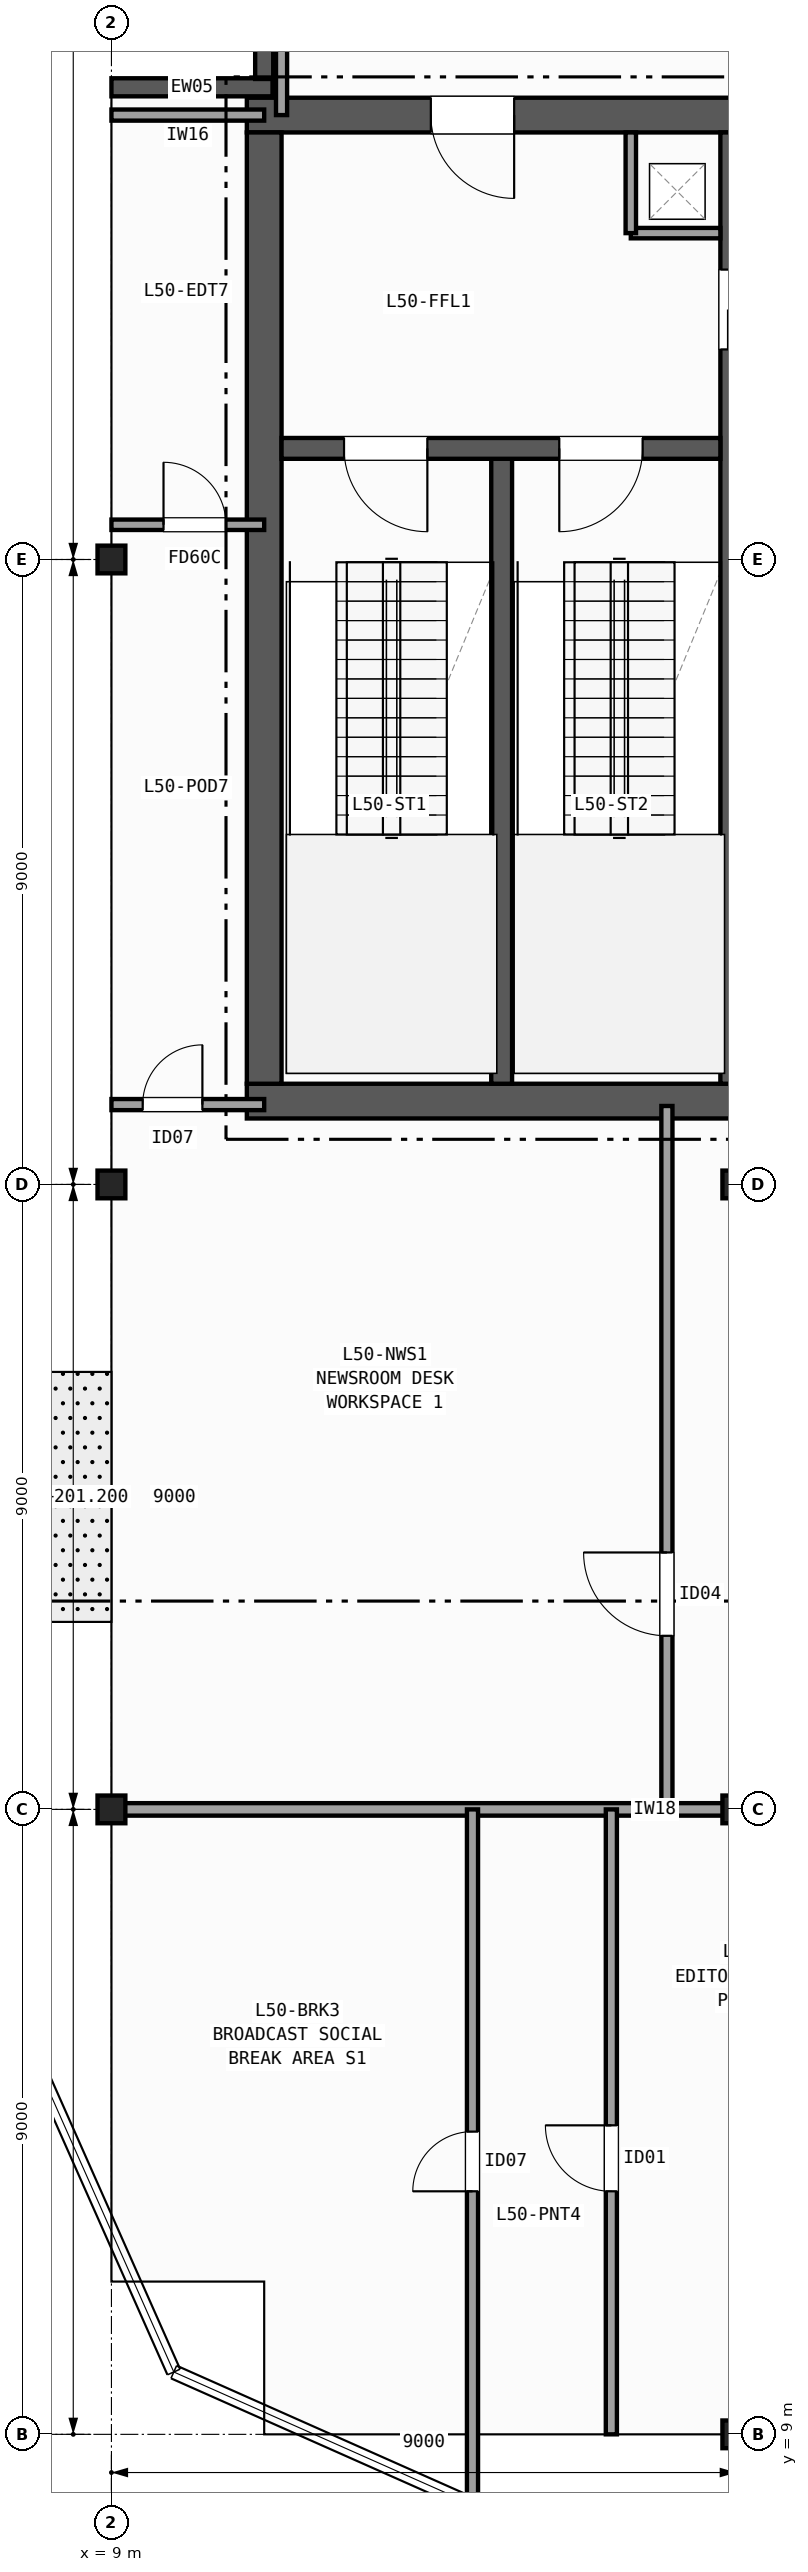
"""IFC4 building model, lengths in metres.
Left out: names, types, materials, properties, quantities, classifications, styles, units other than length and angle.
Written with IfcOpenShell. Run it as: python <this file> out.ifc"""

import sys

from ifc_helpers import new_model, si_unit, direction, frame, frame_2d, origin, origin_2d, place, context, subcontext, project, spatial, rectangle, i_section, extrude, element, fill, save


model = new_model("IFC4")
c1 = context("Model", 3, precision=1e-05, world=origin(), true_north=direction((0.0, 1.0)))
c2 = subcontext(c1, "Body", "Model", "MODEL_VIEW")
j1 = project(units=[si_unit("LENGTHUNIT", "METRE"), si_unit("PLANEANGLEUNIT", "RADIAN")], contexts=[c1])
p1 = place(None, origin())
s1 = spatial("IfcSite", under=j1, at=p1, CompositionType="ELEMENT")
p2 = place(p1, origin())
s2 = spatial("IfcBuilding", under=s1, at=p2, CompositionType="ELEMENT")
p3 = place(p2, frame((0.0, 0.0, 201.2)))
s3 = spatial("IfcBuildingStorey", under=s2, at=p3, CompositionType="ELEMENT", Elevation=201.2)
for number, where, z_axis, x_axis in (
    (1, (9.0, 18.0, 0.0), (0.0, 0.0, 1.0), (1.0, 0.0, 0.0)),
    (2, (9.0, 27.0, 0.0), (0.0, 0.0, 1.0), (1.0, 0.0, 0.0)),
    (3, (9.0, 36.0, 0.0), (0.0, 0.0, 1.0), (1.0, 0.0, 0.0)),
    (4, (18.0, 9.0, 0.0), (0.0, 0.0, 1.0), (1.0, 0.0, 0.0)),
    (5, (18.0, 18.0, 0.0), (0.0, 0.0, 1.0), (1.0, 0.0, 0.0)),
    (6, (18.0, 27.0, 0.0), (0.0, 0.0, 1.0), (1.0, 0.0, 0.0)),
):
    element("IfcColumn", number, at=place(p3, frame(where, z_axis=z_axis, x_axis=x_axis)), inside=s3, PredefinedType="COLUMN", context=c2, shape_type="SweptSolid", body=[
        extrude(i_section(OverallWidth=0.401, OverallDepth=0.399, WebThickness=0.025, FlangeThickness=0.04, FilletRadius=0.015, at=origin_2d()), origin(), (0.0, 0.0, 1.0), 5.0),
    ])
p4 = place(p3, frame((9.0, 42.8, 0.0), z_axis=(0.0, 0.0, 1.0), x_axis=(1.0, 0.0, 0.0)))
e7 = element("IfcWall", 7, at=p4, inside=s3, PredefinedType="SOLIDWALL", context=c2, shape_type="SweptSolid", body=[
    extrude(rectangle(XDim=2.32, YDim=0.26, at=frame_2d((1.16, 0.0))), origin(), (0.0, 0.0, 1.0), 4.72),
])
p5 = place(p3, frame((11.2, 42.92, 0.0), z_axis=(0.0, 0.0, 1.0), x_axis=(0.0, 1.0, 0.0)))
e8 = element("IfcWall", 8, at=p5, inside=s3, PredefinedType="SOLIDWALL", context=c2, shape_type="SweptSolid", body=[
    extrude(rectangle(XDim=2.08, YDim=0.26, at=frame_2d((1.04, 0.0))), origin(), (0.0, 0.0, 1.0), 4.72),
])
p6 = place(p3, frame((10.95, 28.2, 0.0), z_axis=(0.0, 0.0, 1.0), x_axis=(1.0, 0.0, 0.0)))
e9 = element("IfcWall", 9, at=p6, inside=s3, PredefinedType="SHEAR", context=c2, shape_type="SweptSolid", body=[
    extrude(rectangle(XDim=13.9, YDim=0.5, at=frame_2d((6.95, 0.0))), origin(), (0.0, 0.0, 1.0), 4.72),
])
p7 = place(p3, frame((24.85, 42.4, 0.0), z_axis=(0.0, 0.0, 1.0), x_axis=(-1.0, 0.0, 0.0)))
e10 = element("IfcWall", 10, at=p7, inside=s3, PredefinedType="SHEAR", context=c2, shape_type="SweptSolid", body=[
    extrude(rectangle(XDim=13.9, YDim=0.5, at=frame_2d((6.95, 0.0))), origin(), (0.0, 0.0, 1.0), 4.72),
])
p8 = place(p7, frame((10.05, 0.0, 0.0)))
e11 = element("IfcOpeningElement", 11, at=p8, cuts=e10, PredefinedType="OPENING", context=c2, shape_type="SweptSolid", body=[
    extrude(rectangle(XDim=1.2, YDim=2.15, at=frame_2d((0.6, 1.075))), frame((0.0, 0.26, 0.0), z_axis=(0.0, -1.0, 0.0), x_axis=(1.0, 0.0, 0.0)), (0.0, 0.0, 1.0), 0.52),
])
p9 = place(p7, frame((3.0, 0.0, 0.0)))
e12 = element("IfcOpeningElement", 12, at=p9, cuts=e10, PredefinedType="OPENING", context=c2, shape_type="SweptSolid", body=[
    extrude(rectangle(XDim=0.9, YDim=2.1, at=frame_2d((0.45, 1.05))), frame((0.0, 0.26, 0.0), z_axis=(0.0, -1.0, 0.0), x_axis=(1.0, 0.0, 0.0)), (0.0, 0.0, 1.0), 0.52),
])
p10 = place(p3, frame((11.2, 42.15, 0.0), z_axis=(0.0, 0.0, 1.0), x_axis=(0.0, -1.0, 0.0)))
e13 = element("IfcWall", 13, at=p10, inside=s3, PredefinedType="SHEAR", context=c2, shape_type="SweptSolid", body=[
    extrude(rectangle(XDim=13.7, YDim=0.5, at=frame_2d((6.85, 0.0))), origin(), (0.0, 0.0, 1.0), 4.72),
])
p11 = place(p3, frame((14.62, 28.45, 0.0), z_axis=(0.0, 0.0, 1.0), x_axis=(0.0, 1.0, 0.0)))
e14 = element("IfcWall", 14, at=p11, inside=s3, PredefinedType="SHEAR", context=c2, shape_type="SweptSolid", body=[
    extrude(rectangle(XDim=9.0, YDim=0.3, at=frame_2d((4.5, 0.0))), origin(), (0.0, 0.0, 1.0), 4.72),
])
p12 = place(p3, frame((17.92, 42.15, 0.0), z_axis=(0.0, 0.0, 1.0), x_axis=(0.0, -1.0, 0.0)))
e15 = element("IfcWall", 15, at=p12, inside=s3, PredefinedType="SHEAR", context=c2, shape_type="SweptSolid", body=[
    extrude(rectangle(XDim=13.7, YDim=0.3, at=frame_2d((6.85, 0.0))), origin(), (0.0, 0.0, 1.0), 4.72),
])
p13 = place(p12, frame((1.975, 0.0, 0.0)))
e16 = element("IfcOpeningElement", 16, at=p13, cuts=e15, PredefinedType="OPENING", context=c2, shape_type="SweptSolid", body=[
    extrude(rectangle(XDim=1.15, YDim=2.15, at=frame_2d((0.575, 1.075))), frame((0.0, 0.16, 0.0), z_axis=(0.0, -1.0, 0.0), x_axis=(1.0, 0.0, 0.0)), (0.0, 0.0, 1.0), 0.32),
])
p14 = place(p3, frame((17.77, 37.6, 0.0), z_axis=(0.0, 0.0, 1.0), x_axis=(-1.0, 0.0, 0.0)))
e17 = element("IfcWall", 17, at=p14, inside=s3, PredefinedType="SHEAR", context=c2, shape_type="SweptSolid", body=[
    extrude(rectangle(XDim=6.32, YDim=0.3, at=frame_2d((3.16, 0.0))), origin(), (0.0, 0.0, 1.0), 4.72),
])
p15 = place(p14, frame((4.22, 0.0, 0.0)))
e18 = element("IfcOpeningElement", 18, at=p15, cuts=e17, PredefinedType="OPENING", context=c2, shape_type="SweptSolid", body=[
    extrude(rectangle(XDim=1.2, YDim=2.15, at=frame_2d((0.6, 1.075))), frame((0.0, 0.16, 0.0), z_axis=(0.0, -1.0, 0.0), x_axis=(1.0, 0.0, 0.0)), (0.0, 0.0, 1.0), 0.32),
])
p16 = place(p14, frame((1.12, 0.0, 0.0)))
e19 = element("IfcOpeningElement", 19, at=p16, cuts=e17, PredefinedType="OPENING", context=c2, shape_type="SweptSolid", body=[
    extrude(rectangle(XDim=1.2, YDim=2.15, at=frame_2d((0.6, 1.075))), frame((0.0, 0.16, 0.0), z_axis=(0.0, -1.0, 0.0), x_axis=(1.0, 0.0, 0.0)), (0.0, 0.0, 1.0), 0.32),
])
p17 = place(p3, frame((16.48, 40.7, 0.0), z_axis=(0.0, 0.0, 1.0), x_axis=(1.0, 0.0, 0.0)))
e20 = element("IfcWall", 20, at=p17, inside=s3, PredefinedType="PARTITIONING", context=c2, shape_type="SweptSolid", body=[
    extrude(rectangle(XDim=1.29, YDim=0.15, at=frame_2d((0.645, 0.0))), origin(), (0.0, 0.0, 1.0), 4.72),
])
p18 = place(p3, frame((16.48, 40.7, 0.0), z_axis=(0.0, 0.0, 1.0), x_axis=(0.0, 1.0, 0.0)))
e21 = element("IfcWall", 21, at=p18, inside=s3, PredefinedType="PARTITIONING", context=c2, shape_type="SweptSolid", body=[
    extrude(rectangle(XDim=1.45, YDim=0.15, at=frame_2d((0.725, 0.0))), origin(), (0.0, 0.0, 1.0), 4.72),
])
p19 = place(p3, frame((9.0, 28.15, 0.0), z_axis=(0.0, 0.0, 1.0), x_axis=(1.0, 0.0, 0.0)))
e22 = element("IfcWall", 22, at=p19, inside=s3, PredefinedType="PARTITIONING", context=c2, shape_type="SweptSolid", body=[
    extrude(rectangle(XDim=2.2, YDim=0.16, at=frame_2d((1.1, 0.0))), origin(), (0.0, 0.0, 1.0), 4.007),
])
p20 = place(p19, frame((0.45, 0.0, 0.0)))
e23 = element("IfcOpeningElement", 23, at=p20, cuts=e22, PredefinedType="OPENING", context=c2, shape_type="SweptSolid", body=[
    extrude(rectangle(XDim=0.86, YDim=2.05, at=frame_2d((0.43, 1.025))), frame((0.0, 0.09, 0.0), z_axis=(0.0, -1.0, 0.0), x_axis=(1.0, 0.0, 0.0)), (0.0, 0.0, 1.0), 0.18),
])
p21 = place(p3, frame((9.0, 42.4, 0.0), z_axis=(0.0, 0.0, 1.0), x_axis=(1.0, 0.0, 0.0)))
e24 = element("IfcWall", 24, at=p21, inside=s3, PredefinedType="PARTITIONING", context=c2, shape_type="SweptSolid", body=[
    extrude(rectangle(XDim=2.2, YDim=0.16, at=frame_2d((1.1, 0.0))), origin(), (0.0, 0.0, 1.0), 4.72),
])
p22 = place(p3, frame((11.45, 42.4, 0.0), z_axis=(0.0, 0.0, 1.0), x_axis=(0.0, 1.0, 0.0)))
e25 = element("IfcWall", 25, at=p22, inside=s3, PredefinedType="PARTITIONING", context=c2, shape_type="SweptSolid", body=[
    extrude(rectangle(XDim=2.666, YDim=0.16, at=frame_2d((1.333, 0.0))), origin(), (0.0, 0.0, 1.0), 4.72),
])
p23 = place(p3, frame((9.0, 36.5, 0.0), z_axis=(0.0, 0.0, 1.0), x_axis=(1.0, 0.0, 0.0)))
e26 = element("IfcWall", 26, at=p23, inside=s3, PredefinedType="PARTITIONING", context=c2, shape_type="SweptSolid", body=[
    extrude(rectangle(XDim=2.2, YDim=0.15, at=frame_2d((1.1, 0.0))), origin(), (0.0, 0.0, 1.0), 4.72),
])
p24 = place(p23, frame((0.75, 0.0, 0.0)))
e27 = element("IfcOpeningElement", 27, at=p24, cuts=e26, PredefinedType="OPENING", context=c2, shape_type="SweptSolid", body=[
    extrude(rectangle(XDim=0.9, YDim=2.1, at=frame_2d((0.45, 1.05))), frame((0.0, 0.085, 0.0), z_axis=(0.0, -1.0, 0.0), x_axis=(1.0, 0.0, 0.0)), (0.0, 0.0, 1.0), 0.17),
])
p25 = place(p3, frame((9.0, 18.0, 0.0), z_axis=(0.0, 0.0, 1.0), x_axis=(1.0, 0.0, 0.0)))
e28 = element("IfcWall", 28, at=p25, inside=s3, PredefinedType="PARTITIONING", context=c2, shape_type="SweptSolid", body=[
    extrude(rectangle(XDim=15.65, YDim=0.18, at=frame_2d((7.825, 0.0))), origin(), (0.0, 0.0, 1.0), 4.007),
])
p26 = place(p3, frame((17.0, 18.0, 0.0), z_axis=(0.0, 0.0, 1.0), x_axis=(0.0, 1.0, 0.0)))
e29 = element("IfcWall", 29, at=p26, inside=s3, PredefinedType="PARTITIONING", context=c2, shape_type="SweptSolid", body=[
    extrude(rectangle(XDim=10.13, YDim=0.16, at=frame_2d((5.065, 0.0))), origin(), (0.0, 0.0, 1.0), 4.089),
])
p27 = place(p26, frame((2.5, 0.0, 0.0)))
e30 = element("IfcOpeningElement", 30, at=p27, cuts=e29, PredefinedType="OPENING", context=c2, shape_type="SweptSolid", body=[
    extrude(rectangle(XDim=1.2, YDim=2.15, at=frame_2d((0.6, 1.075))), frame((0.0, 0.09, 0.0), z_axis=(0.0, -1.0, 0.0), x_axis=(1.0, 0.0, 0.0)), (0.0, 0.0, 1.0), 0.18),
])
p28 = place(p3, frame((14.2, 7.987, 0.0), z_axis=(0.0, 0.0, 1.0), x_axis=(0.0, 1.0, 0.0)))
e31 = element("IfcWall", 31, at=p28, inside=s3, PredefinedType="PARTITIONING", context=c2, shape_type="SweptSolid", body=[
    extrude(rectangle(XDim=10.013, YDim=0.16, at=frame_2d((5.006, 0.0))), origin(), (0.0, 0.0, 1.0), 4.089),
])
p29 = place(p28, frame((4.513, 0.0, 0.0)))
e32 = element("IfcOpeningElement", 32, at=p29, cuts=e31, PredefinedType="OPENING", context=c2, shape_type="SweptSolid", body=[
    extrude(rectangle(XDim=0.86, YDim=2.05, at=frame_2d((0.43, 1.025))), frame((0.0, 0.09, 0.0), z_axis=(0.0, -1.0, 0.0), x_axis=(1.0, 0.0, 0.0)), (0.0, 0.0, 1.0), 0.18),
])
p30 = place(p3, frame((16.2, 9.0, 0.0), z_axis=(0.0, 0.0, 1.0), x_axis=(0.0, 1.0, 0.0)))
e33 = element("IfcWall", 33, at=p30, inside=s3, PredefinedType="PARTITIONING", context=c2, shape_type="SweptSolid", body=[
    extrude(rectangle(XDim=9.0, YDim=0.16, at=frame_2d((4.5, 0.0))), origin(), (0.0, 0.0, 1.0), 4.089),
])
p31 = place(p30, frame((3.5, 0.0, 0.0)))
e34 = element("IfcOpeningElement", 34, at=p31, cuts=e33, PredefinedType="OPENING", context=c2, shape_type="SweptSolid", body=[
    extrude(rectangle(XDim=0.95, YDim=2.1, at=frame_2d((0.475, 1.05))), frame((0.0, 0.09, 0.0), z_axis=(0.0, -1.0, 0.0), x_axis=(1.0, 0.0, 0.0)), (0.0, 0.0, 1.0), 0.18),
])
p32 = place(p15, origin())
e35 = element("IfcDoor", 35, at=p32, inside=s3, OperationType="SINGLE_SWING_LEFT", PredefinedType="DOOR", context=c2, shape_type="SweptSolid", body=[
    extrude(rectangle(XDim=1.2, YDim=2.15, at=frame_2d((0.6, 1.075))), frame((0.0, 0.025, 0.0), z_axis=(0.0, -1.0, 0.0), x_axis=(1.0, 0.0, 0.0)), (0.0, 0.0, 1.0), 0.05),
])
fill(e18, e35)
p33 = place(p16, origin())
e36 = element("IfcDoor", 36, at=p33, inside=s3, OperationType="SINGLE_SWING_RIGHT", PredefinedType="DOOR", context=c2, shape_type="SweptSolid", body=[
    extrude(rectangle(XDim=1.2, YDim=2.15, at=frame_2d((0.6, 1.075))), frame((0.0, 0.025, 0.0), z_axis=(0.0, -1.0, 0.0), x_axis=(1.0, 0.0, 0.0)), (0.0, 0.0, 1.0), 0.05),
])
fill(e19, e36)
p34 = place(p8, origin())
e37 = element("IfcDoor", 37, at=p34, inside=s3, OperationType="SINGLE_SWING_LEFT", PredefinedType="DOOR", context=c2, shape_type="SweptSolid", body=[
    extrude(rectangle(XDim=1.2, YDim=2.15, at=frame_2d((0.6, 1.075))), frame((0.0, 0.025, 0.0), z_axis=(0.0, -1.0, 0.0), x_axis=(1.0, 0.0, 0.0)), (0.0, 0.0, 1.0), 0.05),
])
fill(e11, e37)
p35 = place(p20, origin())
e38 = element("IfcDoor", 38, at=p35, inside=s3, OperationType="SINGLE_SWING_RIGHT", PredefinedType="DOOR", context=c2, shape_type="SweptSolid", body=[
    extrude(rectangle(XDim=0.86, YDim=2.05, at=frame_2d((0.43, 1.025))), frame((0.0, 0.025, 0.0), z_axis=(0.0, -1.0, 0.0), x_axis=(1.0, 0.0, 0.0)), (0.0, 0.0, 1.0), 0.05),
])
fill(e23, e38)
p36 = place(p24, origin())
e39 = element("IfcDoor", 39, at=p36, inside=s3, OperationType="SINGLE_SWING_LEFT", PredefinedType="DOOR", context=c2, shape_type="SweptSolid", body=[
    extrude(rectangle(XDim=0.9, YDim=2.1, at=frame_2d((0.45, 1.05))), frame((0.0, 0.025, 0.0), z_axis=(0.0, -1.0, 0.0), x_axis=(1.0, 0.0, 0.0)), (0.0, 0.0, 1.0), 0.05),
])
fill(e27, e39)
p37 = place(p27, origin())
e40 = element("IfcDoor", 40, at=p37, inside=s3, OperationType="SINGLE_SWING_RIGHT", PredefinedType="DOOR", context=c2, shape_type="SweptSolid", body=[
    extrude(rectangle(XDim=1.2, YDim=2.15, at=frame_2d((0.6, 1.075))), frame((0.0, 0.025, 0.0), z_axis=(0.0, -1.0, 0.0), x_axis=(1.0, 0.0, 0.0)), (0.0, 0.0, 1.0), 0.05),
])
fill(e30, e40)
p38 = place(p29, origin())
e41 = element("IfcDoor", 41, at=p38, inside=s3, OperationType="SINGLE_SWING_LEFT", PredefinedType="DOOR", context=c2, shape_type="SweptSolid", body=[
    extrude(rectangle(XDim=0.86, YDim=2.05, at=frame_2d((0.43, 1.025))), frame((0.0, 0.025, 0.0), z_axis=(0.0, -1.0, 0.0), x_axis=(1.0, 0.0, 0.0)), (0.0, 0.0, 1.0), 0.05),
])
fill(e32, e41)
p39 = place(p31, origin())
e42 = element("IfcDoor", 42, at=p39, inside=s3, OperationType="SINGLE_SWING_RIGHT", PredefinedType="DOOR", context=c2, shape_type="SweptSolid", body=[
    extrude(rectangle(XDim=0.95, YDim=2.1, at=frame_2d((0.475, 1.05))), frame((0.0, 0.025, 0.0), z_axis=(0.0, -1.0, 0.0), x_axis=(1.0, 0.0, 0.0)), (0.0, 0.0, 1.0), 0.05),
])
fill(e34, e42)
save(model, sys.argv[1])
